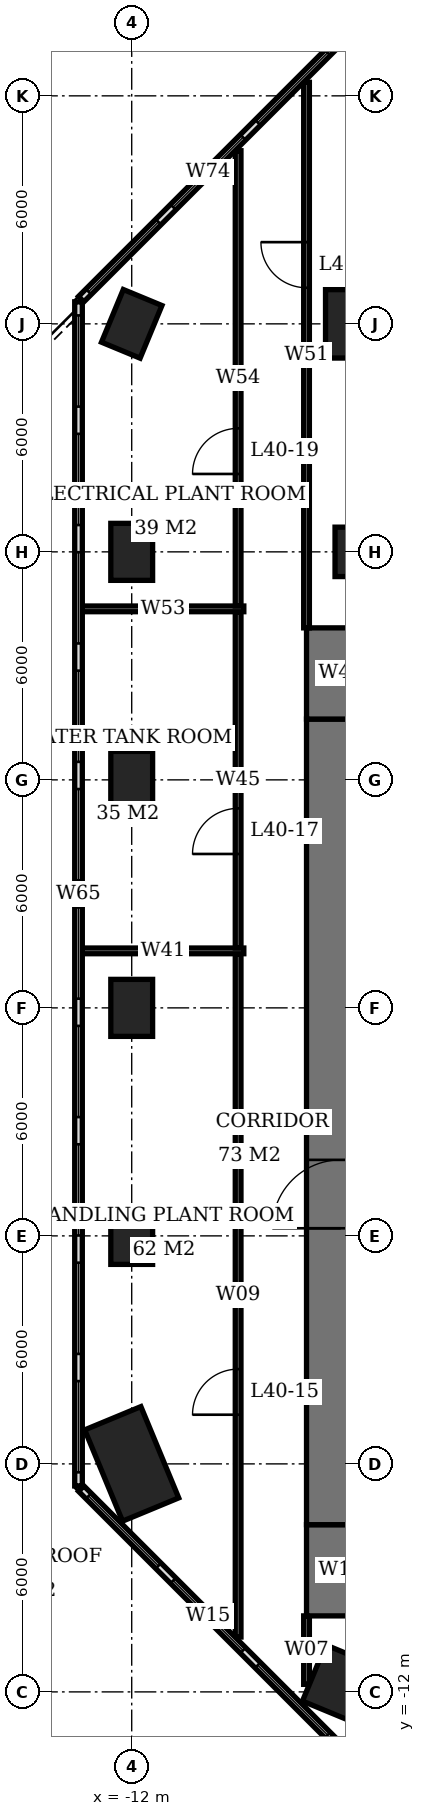
"""IFC4 building model, lengths in metres.
Left out: names, types, materials, properties, quantities, classifications, styles, units other than length and angle.
Written with IfcOpenShell. Run it as: python <this file> out.ifc"""

import sys

from ifc_helpers import new_model, si_unit, direction, frame, frame_2d, origin, origin_2d, place, context, subcontext, project, spatial, rectangle, extrude, element, fill, save


model = new_model("IFC4")
c1 = context("Model", 3, precision=1e-05, world=origin(), true_north=direction((0.0, 1.0)))
c2 = subcontext(c1, "Body", "Model", "MODEL_VIEW")
j1 = project(units=[si_unit("LENGTHUNIT", "METRE"), si_unit("PLANEANGLEUNIT", "RADIAN")], contexts=[c1])
p1 = place(None, origin())
s1 = spatial("IfcSite", under=j1, at=p1, CompositionType="ELEMENT")
p2 = place(p1, origin())
s2 = spatial("IfcBuilding", under=s1, at=p2, CompositionType="ELEMENT")
p3 = place(p2, frame((0.0, 0.0, 164.0)))
s3 = spatial("IfcBuildingStorey", under=s2, at=p3, CompositionType="ELEMENT", Elevation=164.0)
p4 = place(p3, frame((-12.0, -6.0, 0.0), z_axis=(0.0, 0.0, 1.0), x_axis=(-0.382683432365, 0.923879532511, 0.0)))
e1 = element("IfcColumn", 1, at=p4, inside=s3, PredefinedType="COLUMN", context=c2, shape_type="SweptSolid", body=[
    extrude(rectangle(XDim=2.6, YDim=1.6, at=origin_2d()), origin(), (0.0, 0.0, 1.0), 5.4),
])
for number, where, z_axis, x_axis in (
    (2, (-12.0, 0.0, 0.0), (0.0, 0.0, 1.0), (0.0, 1.0, 0.0)),
    (3, (-12.0, 6.0, 0.0), (0.0, 0.0, 1.0), (0.0, 1.0, 0.0)),
    (4, (-12.0, 12.0, 0.0), (0.0, 0.0, 1.0), (0.0, 1.0, 0.0)),
    (5, (-12.0, 18.0, 0.0), (0.0, 0.0, 1.0), (0.0, 1.0, 0.0)),
    (6, (-12.0, 24.0, 0.0), (0.0, 0.0, 1.0), (0.383, 0.924, 0.0)),
):
    element("IfcColumn", number, at=place(p3, frame(where, z_axis=z_axis, x_axis=x_axis)), inside=s3, PredefinedType="COLUMN", context=c2, shape_type="SweptSolid", body=[
        extrude(rectangle(XDim=1.5, YDim=1.1, at=origin_2d()), origin(), (0.0, 0.0, 1.0), 5.4),
    ])
p5 = place(p3, frame((-6.0, -12.0, 0.0), z_axis=(0.0, 0.0, 1.0), x_axis=(-0.923879532511, 0.382683432365, 0.0)))
e7 = element("IfcColumn", 7, at=p5, inside=s3, PredefinedType="COLUMN", context=c2, shape_type="SweptSolid", body=[
    extrude(rectangle(XDim=2.6, YDim=1.6, at=origin_2d()), origin(), (0.0, 0.0, 1.0), 5.4),
])
p6 = place(p3, frame((-6.0, 18.0, 0.0), z_axis=(0.0, 0.0, 1.0), x_axis=(1.0, 0.0, 0.0)))
e8 = element("IfcColumn", 8, at=p6, inside=s3, PredefinedType="COLUMN", context=c2, shape_type="SweptSolid", body=[
    extrude(rectangle(XDim=1.3, YDim=1.3, at=origin_2d()), origin(), (0.0, 0.0, 1.0), 5.4),
])
p7 = place(p3, frame((-6.0, 24.0, 0.0), z_axis=(0.0, 0.0, 1.0), x_axis=(1.0, 0.0, 0.0)))
e9 = element("IfcColumn", 9, at=p7, inside=s3, PredefinedType="COLUMN", context=c2, shape_type="SweptSolid", body=[
    extrude(rectangle(XDim=1.8, YDim=1.8, at=origin_2d()), origin(), (0.0, 0.0, 1.0), 5.4),
])
p8 = place(p3, frame((-6.5, -7.6, 0.0), z_axis=(0.0, 0.0, 1.0), x_axis=(0.0, 1.0, 0.0)))
e10 = element("IfcWall", 10, at=p8, inside=s3, PredefinedType="SHEAR", context=c2, shape_type="SweptSolid", body=[
    extrude(rectangle(XDim=21.2, YDim=1.8, at=frame_2d((10.6, 0.0))), origin(), (0.0, 0.0, 1.0), 5.4),
])
p9 = place(p8, frame((7.8, 0.0, 0.0)))
e11 = element("IfcOpeningElement", 11, at=p9, cuts=e10, PredefinedType="OPENING", context=c2, shape_type="SweptSolid", body=[
    extrude(rectangle(XDim=1.8, YDim=2.4, at=frame_2d((0.9, 1.2))), frame((0.0, 0.91, 0.0), z_axis=(0.0, -1.0, 0.0), x_axis=(1.0, 0.0, 0.0)), (0.0, 0.0, 1.0), 1.82),
])
for number, where, z_axis, x_axis in (
    (12, (-6.5, -10.0, 0.0), (0.0, 0.0, 1.0), (0.0, 1.0, 0.0)),
    (13, (-6.5, 13.6, 0.0), (0.0, 0.0, 1.0), (0.0, 1.0, 0.0)),
):
    element("IfcWall", number, at=place(p3, frame(where, z_axis=z_axis, x_axis=x_axis)), inside=s3, PredefinedType="SHEAR", context=c2, shape_type="SweptSolid", body=[
        extrude(rectangle(XDim=2.4, YDim=1.8, at=frame_2d((1.2, 0.0))), origin(), (0.0, 0.0, 1.0), 5.4),
    ])
p10 = place(p3, frame((-6.651, 31.329, 0.0), z_axis=(0.0, 0.0, 1.0), x_axis=(-0.707106781187, -0.707106781187, 0.0)))
e14 = element("IfcWall", 14, at=p10, inside=s3, PredefinedType="USERDEFINED", context=c2, shape_type="SweptSolid", body=[
    extrude(rectangle(XDim=9.445, YDim=0.2, at=frame_2d((4.723, 0.0))), origin(), (0.0, 0.0, 1.0), 5.4),
])
p11 = place(p10, frame((0.274, 0.0, 0.6)))
e15 = element("IfcOpeningElement", 15, at=p11, cuts=e14, PredefinedType="OPENING", context=c2, shape_type="SweptSolid", body=[
    extrude(rectangle(XDim=2.6, YDim=3.0, at=frame_2d((1.3, 1.5))), frame((0.0, 0.11, 0.0), z_axis=(0.0, -1.0, 0.0), x_axis=(1.0, 0.0, 0.0)), (0.0, 0.0, 1.0), 0.22),
])
p12 = place(p10, frame((3.423, 0.0, 0.6)))
e16 = element("IfcOpeningElement", 16, at=p12, cuts=e14, PredefinedType="OPENING", context=c2, shape_type="SweptSolid", body=[
    extrude(rectangle(XDim=2.6, YDim=3.0, at=frame_2d((1.3, 1.5))), frame((0.0, 0.11, 0.0), z_axis=(0.0, -1.0, 0.0), x_axis=(1.0, 0.0, 0.0)), (0.0, 0.0, 1.0), 0.22),
])
p13 = place(p10, frame((6.571, 0.0, 0.6)))
e17 = element("IfcOpeningElement", 17, at=p13, cuts=e14, PredefinedType="OPENING", context=c2, shape_type="SweptSolid", body=[
    extrude(rectangle(XDim=2.6, YDim=3.0, at=frame_2d((1.3, 1.5))), frame((0.0, 0.11, 0.0), z_axis=(0.0, -1.0, 0.0), x_axis=(1.0, 0.0, 0.0)), (0.0, 0.0, 1.0), 0.22),
])
p14 = place(p3, frame((-13.4, 24.58, 0.0), z_axis=(0.0, 0.0, 1.0), x_axis=(0.0, -1.0, 0.0)))
e18 = element("IfcWall", 18, at=p14, inside=s3, PredefinedType="USERDEFINED", context=c2, shape_type="SweptSolid", body=[
    extrude(rectangle(XDim=31.16, YDim=0.2, at=frame_2d((15.58, 0.0))), origin(), (0.0, 0.0, 1.0), 5.4),
])
p15 = place(p14, frame((0.358, 0.0, 0.6)))
e19 = element("IfcOpeningElement", 19, at=p15, cuts=e18, PredefinedType="OPENING", context=c2, shape_type="SweptSolid", body=[
    extrude(rectangle(XDim=2.4, YDim=3.0, at=frame_2d((1.2, 1.5))), frame((0.0, 0.11, 0.0), z_axis=(0.0, -1.0, 0.0), x_axis=(1.0, 0.0, 0.0)), (0.0, 0.0, 1.0), 0.22),
])
p16 = place(p14, frame((3.474, 0.0, 0.6)))
e20 = element("IfcOpeningElement", 20, at=p16, cuts=e18, PredefinedType="OPENING", context=c2, shape_type="SweptSolid", body=[
    extrude(rectangle(XDim=2.4, YDim=3.0, at=frame_2d((1.2, 1.5))), frame((0.0, 0.11, 0.0), z_axis=(0.0, -1.0, 0.0), x_axis=(1.0, 0.0, 0.0)), (0.0, 0.0, 1.0), 0.22),
])
p17 = place(p14, frame((6.59, 0.0, 0.6)))
e21 = element("IfcOpeningElement", 21, at=p17, cuts=e18, PredefinedType="OPENING", context=c2, shape_type="SweptSolid", body=[
    extrude(rectangle(XDim=2.4, YDim=3.0, at=frame_2d((1.2, 1.5))), frame((0.0, 0.11, 0.0), z_axis=(0.0, -1.0, 0.0), x_axis=(1.0, 0.0, 0.0)), (0.0, 0.0, 1.0), 0.22),
])
p18 = place(p14, frame((9.706, 0.0, 0.6)))
e22 = element("IfcOpeningElement", 22, at=p18, cuts=e18, PredefinedType="OPENING", context=c2, shape_type="SweptSolid", body=[
    extrude(rectangle(XDim=2.4, YDim=3.0, at=frame_2d((1.2, 1.5))), frame((0.0, 0.11, 0.0), z_axis=(0.0, -1.0, 0.0), x_axis=(1.0, 0.0, 0.0)), (0.0, 0.0, 1.0), 0.22),
])
p19 = place(p14, frame((12.822, 0.0, 0.6)))
e23 = element("IfcOpeningElement", 23, at=p19, cuts=e18, PredefinedType="OPENING", context=c2, shape_type="SweptSolid", body=[
    extrude(rectangle(XDim=2.4, YDim=3.0, at=frame_2d((1.2, 1.5))), frame((0.0, 0.11, 0.0), z_axis=(0.0, -1.0, 0.0), x_axis=(1.0, 0.0, 0.0)), (0.0, 0.0, 1.0), 0.22),
])
p20 = place(p14, frame((15.938, 0.0, 0.6)))
e24 = element("IfcOpeningElement", 24, at=p20, cuts=e18, PredefinedType="OPENING", context=c2, shape_type="SweptSolid", body=[
    extrude(rectangle(XDim=2.4, YDim=3.0, at=frame_2d((1.2, 1.5))), frame((0.0, 0.11, 0.0), z_axis=(0.0, -1.0, 0.0), x_axis=(1.0, 0.0, 0.0)), (0.0, 0.0, 1.0), 0.22),
])
p21 = place(p14, frame((19.054, 0.0, 0.6)))
e25 = element("IfcOpeningElement", 25, at=p21, cuts=e18, PredefinedType="OPENING", context=c2, shape_type="SweptSolid", body=[
    extrude(rectangle(XDim=2.4, YDim=3.0, at=frame_2d((1.2, 1.5))), frame((0.0, 0.11, 0.0), z_axis=(0.0, -1.0, 0.0), x_axis=(1.0, 0.0, 0.0)), (0.0, 0.0, 1.0), 0.22),
])
p22 = place(p14, frame((22.17, 0.0, 0.6)))
e26 = element("IfcOpeningElement", 26, at=p22, cuts=e18, PredefinedType="OPENING", context=c2, shape_type="SweptSolid", body=[
    extrude(rectangle(XDim=2.4, YDim=3.0, at=frame_2d((1.2, 1.5))), frame((0.0, 0.11, 0.0), z_axis=(0.0, -1.0, 0.0), x_axis=(1.0, 0.0, 0.0)), (0.0, 0.0, 1.0), 0.22),
])
p23 = place(p14, frame((25.286, 0.0, 0.6)))
e27 = element("IfcOpeningElement", 27, at=p23, cuts=e18, PredefinedType="OPENING", context=c2, shape_type="SweptSolid", body=[
    extrude(rectangle(XDim=2.4, YDim=3.0, at=frame_2d((1.2, 1.5))), frame((0.0, 0.11, 0.0), z_axis=(0.0, -1.0, 0.0), x_axis=(1.0, 0.0, 0.0)), (0.0, 0.0, 1.0), 0.22),
])
p24 = place(p14, frame((28.402, 0.0, 0.6)))
e28 = element("IfcOpeningElement", 28, at=p24, cuts=e18, PredefinedType="OPENING", context=c2, shape_type="SweptSolid", body=[
    extrude(rectangle(XDim=2.4, YDim=3.0, at=frame_2d((1.2, 1.5))), frame((0.0, 0.11, 0.0), z_axis=(0.0, -1.0, 0.0), x_axis=(1.0, 0.0, 0.0)), (0.0, 0.0, 1.0), 0.22),
])
p25 = place(p3, frame((-13.329, -6.651, 0.0), z_axis=(0.0, 0.0, 1.0), x_axis=(0.707106781187, -0.707106781187, 0.0)))
e29 = element("IfcWall", 29, at=p25, inside=s3, PredefinedType="USERDEFINED", context=c2, shape_type="SweptSolid", body=[
    extrude(rectangle(XDim=9.445, YDim=0.2, at=frame_2d((4.723, 0.0))), origin(), (0.0, 0.0, 1.0), 5.4),
])
p26 = place(p25, frame((0.274, 0.0, 0.6)))
e30 = element("IfcOpeningElement", 30, at=p26, cuts=e29, PredefinedType="OPENING", context=c2, shape_type="SweptSolid", body=[
    extrude(rectangle(XDim=2.6, YDim=3.0, at=frame_2d((1.3, 1.5))), frame((0.0, 0.11, 0.0), z_axis=(0.0, -1.0, 0.0), x_axis=(1.0, 0.0, 0.0)), (0.0, 0.0, 1.0), 0.22),
])
p27 = place(p25, frame((3.423, 0.0, 0.6)))
e31 = element("IfcOpeningElement", 31, at=p27, cuts=e29, PredefinedType="OPENING", context=c2, shape_type="SweptSolid", body=[
    extrude(rectangle(XDim=2.6, YDim=3.0, at=frame_2d((1.3, 1.5))), frame((0.0, 0.11, 0.0), z_axis=(0.0, -1.0, 0.0), x_axis=(1.0, 0.0, 0.0)), (0.0, 0.0, 1.0), 0.22),
])
p28 = place(p25, frame((6.571, 0.0, 0.6)))
e32 = element("IfcOpeningElement", 32, at=p28, cuts=e29, PredefinedType="OPENING", context=c2, shape_type="SweptSolid", body=[
    extrude(rectangle(XDim=2.6, YDim=3.0, at=frame_2d((1.3, 1.5))), frame((0.0, 0.11, 0.0), z_axis=(0.0, -1.0, 0.0), x_axis=(1.0, 0.0, 0.0)), (0.0, 0.0, 1.0), 0.22),
])
p29 = place(p3, frame((-12.37, -16.923, 0.0), z_axis=(0.0, 0.0, 1.0), x_axis=(-0.707106781187, 0.707106781187, 0.0)))
e33 = element("IfcWall", 33, at=p29, inside=s3, PredefinedType="USERDEFINED", context=c2, shape_type="SweptSolid", body=[
    extrude(rectangle(XDim=6.438, YDim=0.3, at=frame_2d((3.219, 0.0))), origin(), (0.0, 0.0, 1.0), 0.6),
])
for number, where, z_axis, x_axis in (
    (34, (-13.3, 7.5, 0.0), (0.0, 0.0, 1.0), (1.0, 0.0, 0.0)),
    (35, (-13.3, 16.5, 0.0), (0.0, 0.0, 1.0), (1.0, 0.0, 0.0)),
):
    element("IfcWall", number, at=place(p3, frame(where, z_axis=z_axis, x_axis=x_axis)), inside=s3, PredefinedType="PARTITIONING", context=c2, shape_type="SweptSolid", body=[
        extrude(rectangle(XDim=4.25, YDim=0.15, at=frame_2d((2.125, 0.0))), origin(), (0.0, 0.0, 1.0), 5.15),
    ])
p30 = place(p3, frame((-9.2, -10.556, 0.0), z_axis=(0.0, 0.0, 1.0), x_axis=(0.0, 1.0, 0.0)))
e36 = element("IfcWall", 36, at=p30, inside=s3, PredefinedType="PARTITIONING", context=c2, shape_type="SweptSolid", body=[
    extrude(rectangle(XDim=17.981, YDim=0.15, at=frame_2d((8.99, 0.0))), origin(), (0.0, 0.0, 1.0), 5.15),
])
p31 = place(p30, frame((5.85, 0.0, 0.0)))
e37 = element("IfcOpeningElement", 37, at=p31, cuts=e36, PredefinedType="OPENING", context=c2, shape_type="SweptSolid", body=[
    extrude(rectangle(XDim=1.2, YDim=2.4, at=frame_2d((0.6, 1.2))), frame((0.0, 0.085, 0.0), z_axis=(0.0, -1.0, 0.0), x_axis=(1.0, 0.0, 0.0)), (0.0, 0.0, 1.0), 0.17),
])
p32 = place(p3, frame((-9.2, 7.575, 0.0), z_axis=(0.0, 0.0, 1.0), x_axis=(0.0, 1.0, 0.0)))
e38 = element("IfcWall", 38, at=p32, inside=s3, PredefinedType="PARTITIONING", context=c2, shape_type="SweptSolid", body=[
    extrude(rectangle(XDim=8.85, YDim=0.15, at=frame_2d((4.425, 0.0))), origin(), (0.0, 0.0, 1.0), 5.15),
])
p33 = place(p32, frame((2.475, 0.0, 0.0)))
e39 = element("IfcOpeningElement", 39, at=p33, cuts=e38, PredefinedType="OPENING", context=c2, shape_type="SweptSolid", body=[
    extrude(rectangle(XDim=1.2, YDim=2.4, at=frame_2d((0.6, 1.2))), frame((0.0, 0.085, 0.0), z_axis=(0.0, -1.0, 0.0), x_axis=(1.0, 0.0, 0.0)), (0.0, 0.0, 1.0), 0.17),
])
p34 = place(p3, frame((-9.2, 16.575, 0.0), z_axis=(0.0, 0.0, 1.0), x_axis=(0.0, 1.0, 0.0)))
e40 = element("IfcWall", 40, at=p34, inside=s3, PredefinedType="PARTITIONING", context=c2, shape_type="SweptSolid", body=[
    extrude(rectangle(XDim=11.981, YDim=0.15, at=frame_2d((5.99, 0.0))), origin(), (0.0, 0.0, 1.0), 5.15),
])
p35 = place(p34, frame((3.475, 0.0, 0.0)))
e41 = element("IfcOpeningElement", 41, at=p35, cuts=e40, PredefinedType="OPENING", context=c2, shape_type="SweptSolid", body=[
    extrude(rectangle(XDim=1.2, YDim=2.4, at=frame_2d((0.6, 1.2))), frame((0.0, 0.085, 0.0), z_axis=(0.0, -1.0, 0.0), x_axis=(1.0, 0.0, 0.0)), (0.0, 0.0, 1.0), 0.17),
])
p36 = place(p3, frame((-7.4, -11.802, 0.0), z_axis=(0.0, 0.0, 1.0), x_axis=(0.0, 1.0, 0.0)))
e42 = element("IfcWall", 42, at=p36, inside=s3, PredefinedType="PARTITIONING", context=c2, shape_type="SweptSolid", body=[
    extrude(rectangle(XDim=1.802, YDim=0.15, at=frame_2d((0.901, 0.0))), origin(), (0.0, 0.0, 1.0), 5.15),
])
p37 = place(p3, frame((-7.4, 16.0, 0.0), z_axis=(0.0, 0.0, 1.0), x_axis=(0.0, 1.0, 0.0)))
e43 = element("IfcWall", 43, at=p37, inside=s3, PredefinedType="PARTITIONING", context=c2, shape_type="SweptSolid", body=[
    extrude(rectangle(XDim=14.356, YDim=0.15, at=frame_2d((7.178, 0.0))), origin(), (0.0, 0.0, 1.0), 5.15),
])
p38 = place(p37, frame((8.95, 0.0, 0.0)))
e44 = element("IfcOpeningElement", 44, at=p38, cuts=e43, PredefinedType="OPENING", context=c2, shape_type="SweptSolid", body=[
    extrude(rectangle(XDim=1.2, YDim=2.4, at=frame_2d((0.6, 1.2))), frame((0.0, 0.085, 0.0), z_axis=(0.0, -1.0, 0.0), x_axis=(1.0, 0.0, 0.0)), (0.0, 0.0, 1.0), 0.17),
])
p39 = place(p11, origin())
e45 = element("IfcWindow", 45, at=p39, inside=s3, PartitioningType="SINGLE_PANEL", PredefinedType="USERDEFINED", context=c2, shape_type="SweptSolid", body=[
    extrude(rectangle(XDim=2.6, YDim=3.0, at=frame_2d((1.3, 1.5))), frame((0.0, 0.03, 0.0), z_axis=(0.0, -1.0, 0.0), x_axis=(1.0, 0.0, 0.0)), (0.0, 0.0, 1.0), 0.06),
])
fill(e15, e45)
p40 = place(p12, origin())
e46 = element("IfcWindow", 46, at=p40, inside=s3, PartitioningType="SINGLE_PANEL", PredefinedType="USERDEFINED", context=c2, shape_type="SweptSolid", body=[
    extrude(rectangle(XDim=2.6, YDim=3.0, at=frame_2d((1.3, 1.5))), frame((0.0, 0.03, 0.0), z_axis=(0.0, -1.0, 0.0), x_axis=(1.0, 0.0, 0.0)), (0.0, 0.0, 1.0), 0.06),
])
fill(e16, e46)
p41 = place(p13, origin())
e47 = element("IfcWindow", 47, at=p41, inside=s3, PartitioningType="SINGLE_PANEL", PredefinedType="USERDEFINED", context=c2, shape_type="SweptSolid", body=[
    extrude(rectangle(XDim=2.6, YDim=3.0, at=frame_2d((1.3, 1.5))), frame((0.0, 0.03, 0.0), z_axis=(0.0, -1.0, 0.0), x_axis=(1.0, 0.0, 0.0)), (0.0, 0.0, 1.0), 0.06),
])
fill(e17, e47)
p42 = place(p15, origin())
e48 = element("IfcWindow", 48, at=p42, inside=s3, PartitioningType="SINGLE_PANEL", PredefinedType="USERDEFINED", context=c2, shape_type="SweptSolid", body=[
    extrude(rectangle(XDim=2.4, YDim=3.0, at=frame_2d((1.2, 1.5))), frame((0.0, 0.03, 0.0), z_axis=(0.0, -1.0, 0.0), x_axis=(1.0, 0.0, 0.0)), (0.0, 0.0, 1.0), 0.06),
])
fill(e19, e48)
p43 = place(p16, origin())
e49 = element("IfcWindow", 49, at=p43, inside=s3, PartitioningType="SINGLE_PANEL", PredefinedType="USERDEFINED", context=c2, shape_type="SweptSolid", body=[
    extrude(rectangle(XDim=2.4, YDim=3.0, at=frame_2d((1.2, 1.5))), frame((0.0, 0.03, 0.0), z_axis=(0.0, -1.0, 0.0), x_axis=(1.0, 0.0, 0.0)), (0.0, 0.0, 1.0), 0.06),
])
fill(e20, e49)
p44 = place(p17, origin())
e50 = element("IfcWindow", 50, at=p44, inside=s3, PartitioningType="SINGLE_PANEL", PredefinedType="USERDEFINED", context=c2, shape_type="SweptSolid", body=[
    extrude(rectangle(XDim=2.4, YDim=3.0, at=frame_2d((1.2, 1.5))), frame((0.0, 0.03, 0.0), z_axis=(0.0, -1.0, 0.0), x_axis=(1.0, 0.0, 0.0)), (0.0, 0.0, 1.0), 0.06),
])
fill(e21, e50)
p45 = place(p18, origin())
e51 = element("IfcWindow", 51, at=p45, inside=s3, PartitioningType="SINGLE_PANEL", PredefinedType="USERDEFINED", context=c2, shape_type="SweptSolid", body=[
    extrude(rectangle(XDim=2.4, YDim=3.0, at=frame_2d((1.2, 1.5))), frame((0.0, 0.03, 0.0), z_axis=(0.0, -1.0, 0.0), x_axis=(1.0, 0.0, 0.0)), (0.0, 0.0, 1.0), 0.06),
])
fill(e22, e51)
p46 = place(p19, origin())
e52 = element("IfcWindow", 52, at=p46, inside=s3, PartitioningType="SINGLE_PANEL", PredefinedType="USERDEFINED", context=c2, shape_type="SweptSolid", body=[
    extrude(rectangle(XDim=2.4, YDim=3.0, at=frame_2d((1.2, 1.5))), frame((0.0, 0.03, 0.0), z_axis=(0.0, -1.0, 0.0), x_axis=(1.0, 0.0, 0.0)), (0.0, 0.0, 1.0), 0.06),
])
fill(e23, e52)
p47 = place(p20, origin())
e53 = element("IfcWindow", 53, at=p47, inside=s3, PartitioningType="SINGLE_PANEL", PredefinedType="USERDEFINED", context=c2, shape_type="SweptSolid", body=[
    extrude(rectangle(XDim=2.4, YDim=3.0, at=frame_2d((1.2, 1.5))), frame((0.0, 0.03, 0.0), z_axis=(0.0, -1.0, 0.0), x_axis=(1.0, 0.0, 0.0)), (0.0, 0.0, 1.0), 0.06),
])
fill(e24, e53)
p48 = place(p21, origin())
e54 = element("IfcWindow", 54, at=p48, inside=s3, PartitioningType="SINGLE_PANEL", PredefinedType="USERDEFINED", context=c2, shape_type="SweptSolid", body=[
    extrude(rectangle(XDim=2.4, YDim=3.0, at=frame_2d((1.2, 1.5))), frame((0.0, 0.03, 0.0), z_axis=(0.0, -1.0, 0.0), x_axis=(1.0, 0.0, 0.0)), (0.0, 0.0, 1.0), 0.06),
])
fill(e25, e54)
p49 = place(p22, origin())
e55 = element("IfcWindow", 55, at=p49, inside=s3, PartitioningType="SINGLE_PANEL", PredefinedType="USERDEFINED", context=c2, shape_type="SweptSolid", body=[
    extrude(rectangle(XDim=2.4, YDim=3.0, at=frame_2d((1.2, 1.5))), frame((0.0, 0.03, 0.0), z_axis=(0.0, -1.0, 0.0), x_axis=(1.0, 0.0, 0.0)), (0.0, 0.0, 1.0), 0.06),
])
fill(e26, e55)
p50 = place(p23, origin())
e56 = element("IfcWindow", 56, at=p50, inside=s3, PartitioningType="SINGLE_PANEL", PredefinedType="USERDEFINED", context=c2, shape_type="SweptSolid", body=[
    extrude(rectangle(XDim=2.4, YDim=3.0, at=frame_2d((1.2, 1.5))), frame((0.0, 0.03, 0.0), z_axis=(0.0, -1.0, 0.0), x_axis=(1.0, 0.0, 0.0)), (0.0, 0.0, 1.0), 0.06),
])
fill(e27, e56)
p51 = place(p24, origin())
e57 = element("IfcWindow", 57, at=p51, inside=s3, PartitioningType="SINGLE_PANEL", PredefinedType="USERDEFINED", context=c2, shape_type="SweptSolid", body=[
    extrude(rectangle(XDim=2.4, YDim=3.0, at=frame_2d((1.2, 1.5))), frame((0.0, 0.03, 0.0), z_axis=(0.0, -1.0, 0.0), x_axis=(1.0, 0.0, 0.0)), (0.0, 0.0, 1.0), 0.06),
])
fill(e28, e57)
p52 = place(p26, origin())
e58 = element("IfcWindow", 58, at=p52, inside=s3, PartitioningType="SINGLE_PANEL", PredefinedType="USERDEFINED", context=c2, shape_type="SweptSolid", body=[
    extrude(rectangle(XDim=2.6, YDim=3.0, at=frame_2d((1.3, 1.5))), frame((0.0, 0.03, 0.0), z_axis=(0.0, -1.0, 0.0), x_axis=(1.0, 0.0, 0.0)), (0.0, 0.0, 1.0), 0.06),
])
fill(e30, e58)
p53 = place(p27, origin())
e59 = element("IfcWindow", 59, at=p53, inside=s3, PartitioningType="SINGLE_PANEL", PredefinedType="USERDEFINED", context=c2, shape_type="SweptSolid", body=[
    extrude(rectangle(XDim=2.6, YDim=3.0, at=frame_2d((1.3, 1.5))), frame((0.0, 0.03, 0.0), z_axis=(0.0, -1.0, 0.0), x_axis=(1.0, 0.0, 0.0)), (0.0, 0.0, 1.0), 0.06),
])
fill(e31, e59)
p54 = place(p28, origin())
e60 = element("IfcWindow", 60, at=p54, inside=s3, PartitioningType="SINGLE_PANEL", PredefinedType="USERDEFINED", context=c2, shape_type="SweptSolid", body=[
    extrude(rectangle(XDim=2.6, YDim=3.0, at=frame_2d((1.3, 1.5))), frame((0.0, 0.03, 0.0), z_axis=(0.0, -1.0, 0.0), x_axis=(1.0, 0.0, 0.0)), (0.0, 0.0, 1.0), 0.06),
])
fill(e32, e60)
p55 = place(p9, origin())
e61 = element("IfcDoor", 61, at=p55, inside=s3, OperationType="DOUBLE_DOOR_SINGLE_SWING", PredefinedType="DOOR", context=c2, shape_type="SweptSolid", body=[
    extrude(rectangle(XDim=1.8, YDim=2.4, at=frame_2d((0.9, 1.2))), frame((0.0, 0.025, 0.0), z_axis=(0.0, -1.0, 0.0), x_axis=(1.0, 0.0, 0.0)), (0.0, 0.0, 1.0), 0.05),
])
fill(e11, e61)
p56 = place(p31, origin())
e62 = element("IfcDoor", 62, at=p56, inside=s3, OperationType="SINGLE_SWING_LEFT", PredefinedType="DOOR", context=c2, shape_type="SweptSolid", body=[
    extrude(rectangle(XDim=1.2, YDim=2.4, at=frame_2d((0.6, 1.2))), frame((0.0, 0.025, 0.0), z_axis=(0.0, -1.0, 0.0), x_axis=(1.0, 0.0, 0.0)), (0.0, 0.0, 1.0), 0.05),
])
fill(e37, e62)
p57 = place(p33, origin())
e63 = element("IfcDoor", 63, at=p57, inside=s3, OperationType="SINGLE_SWING_LEFT", PredefinedType="DOOR", context=c2, shape_type="SweptSolid", body=[
    extrude(rectangle(XDim=1.2, YDim=2.4, at=frame_2d((0.6, 1.2))), frame((0.0, 0.025, 0.0), z_axis=(0.0, -1.0, 0.0), x_axis=(1.0, 0.0, 0.0)), (0.0, 0.0, 1.0), 0.05),
])
fill(e39, e63)
p58 = place(p35, origin())
e64 = element("IfcDoor", 64, at=p58, inside=s3, OperationType="SINGLE_SWING_LEFT", PredefinedType="DOOR", context=c2, shape_type="SweptSolid", body=[
    extrude(rectangle(XDim=1.2, YDim=2.4, at=frame_2d((0.6, 1.2))), frame((0.0, 0.025, 0.0), z_axis=(0.0, -1.0, 0.0), x_axis=(1.0, 0.0, 0.0)), (0.0, 0.0, 1.0), 0.05),
])
fill(e41, e64)
p59 = place(p38, origin())
e65 = element("IfcDoor", 65, at=p59, inside=s3, OperationType="SINGLE_SWING_RIGHT", PredefinedType="DOOR", context=c2, shape_type="SweptSolid", body=[
    extrude(rectangle(XDim=1.2, YDim=2.4, at=frame_2d((0.6, 1.2))), frame((0.0, 0.025, 0.0), z_axis=(0.0, -1.0, 0.0), x_axis=(1.0, 0.0, 0.0)), (0.0, 0.0, 1.0), 0.05),
])
fill(e44, e65)
save(model, sys.argv[1])
